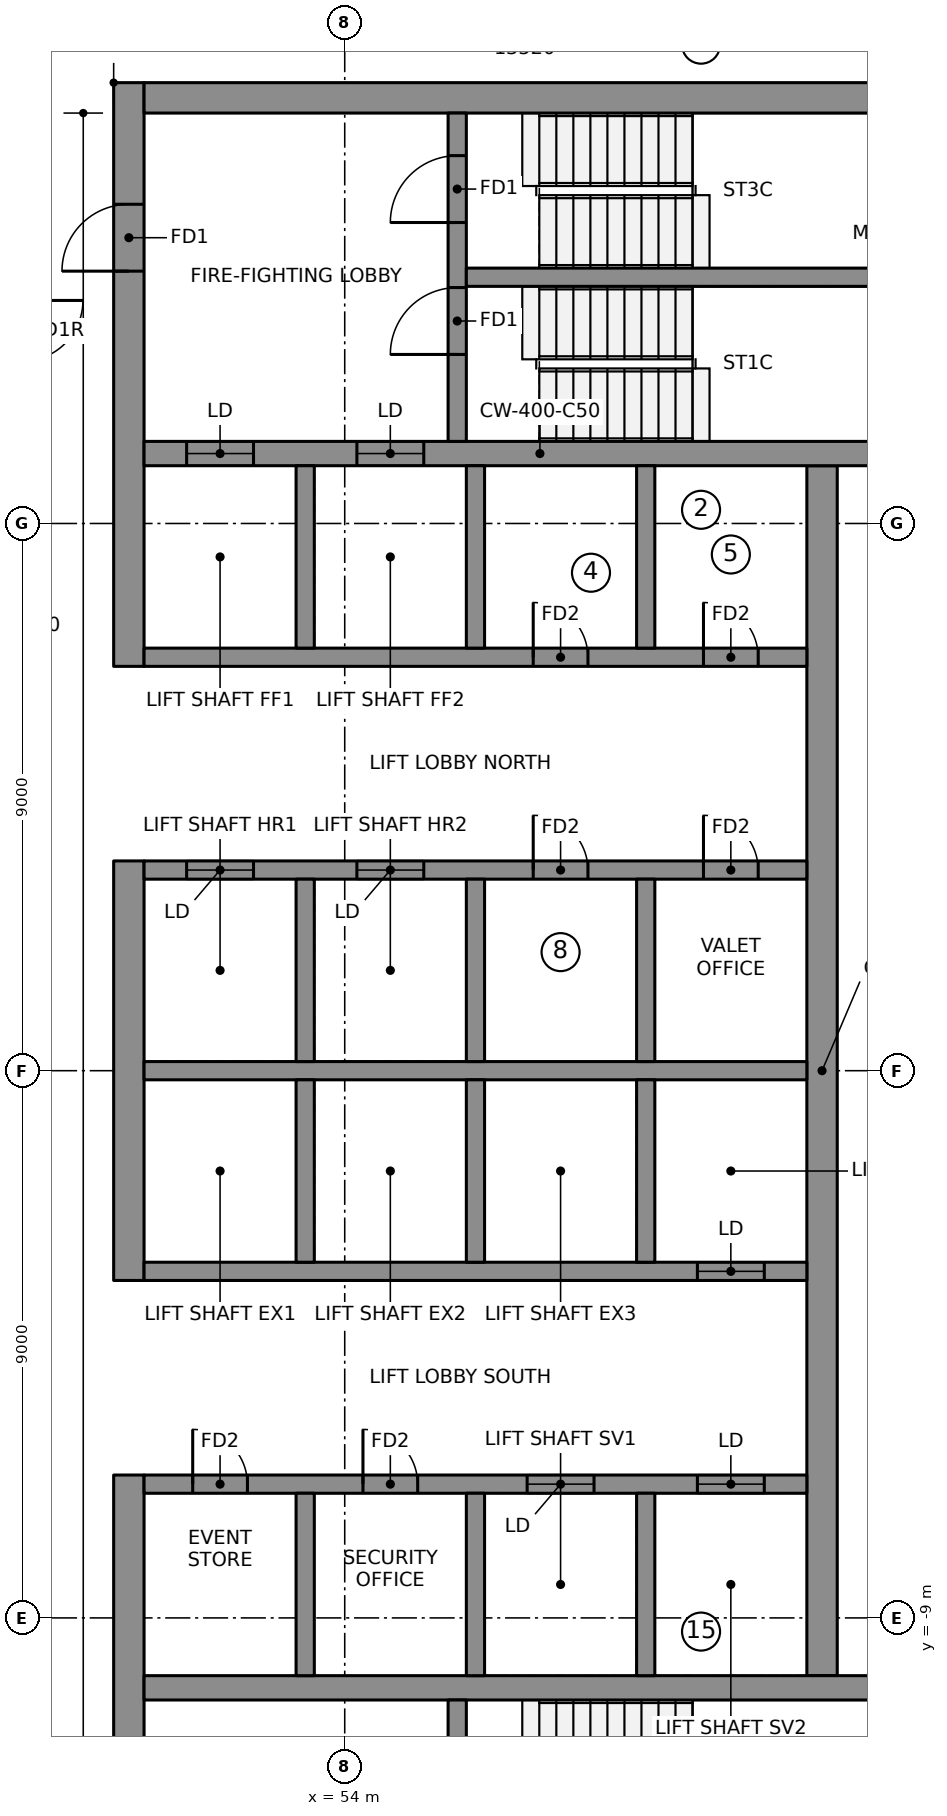
"""IFC4 building model, lengths in metres.
Left out: names, types, materials, properties, quantities, classifications, styles, units other than length and angle.
Written with IfcOpenShell. Run it as: python <this file> out.ifc"""

import sys

from ifc_helpers import new_model, si_unit, direction, frame, frame_2d, origin, place, context, subcontext, project, spatial, rectangle, extrude, element, fill, save


model = new_model("IFC4")
c1 = context("Model", 3, precision=1e-05, world=origin(), true_north=direction((0.0, 1.0)))
c2 = subcontext(c1, "Body", "Model", "MODEL_VIEW")
j1 = project(units=[si_unit("LENGTHUNIT", "METRE"), si_unit("PLANEANGLEUNIT", "RADIAN")], contexts=[c1])
p1 = place(None, origin())
s1 = spatial("IfcSite", under=j1, at=p1, CompositionType="ELEMENT")
p2 = place(p1, origin())
s2 = spatial("IfcBuilding", under=s1, at=p2, CompositionType="ELEMENT")
p3 = place(p2, frame((0.0, 0.0, 271.45)))
s3 = spatial("IfcBuildingStorey", under=s2, at=p3, CompositionType="ELEMENT", Elevation=271.45)
p4 = place(p3, frame((50.45, 6.65, 0.0), z_axis=(0.0, 0.0, 1.0), x_axis=(0.0, 1.0, 0.0)))
e1 = element("IfcWall", 1, at=p4, inside=s3, PredefinedType="SHEAR", context=c2, shape_type="SweptSolid", body=[
    extrude(rectangle(XDim=9.6, YDim=0.5, at=frame_2d((4.8, 0.0))), origin(), (0.0, 0.0, 1.0), 3.55),
])
p5 = place(p4, frame((6.5, 0.0, 0.0)))
e2 = element("IfcOpeningElement", 2, at=p5, cuts=e1, PredefinedType="OPENING", context=c2, shape_type="SweptSolid", body=[
    extrude(rectangle(XDim=1.1, YDim=2.1, at=frame_2d((0.55, 1.05))), frame((0.0, 0.26, 0.0), z_axis=(0.0, -1.0, 0.0), x_axis=(1.0, 0.0, 0.0)), (0.0, 0.0, 1.0), 0.52),
])
p6 = place(p3, frame((50.45, -3.45, 0.0), z_axis=(0.0, 0.0, 1.0), x_axis=(0.0, 1.0, 0.0)))
e3 = element("IfcWall", 3, at=p6, inside=s3, PredefinedType="SHEAR", context=c2, shape_type="SweptSolid", body=[
    extrude(rectangle(XDim=6.9, YDim=0.5, at=frame_2d((3.45, 0.0))), origin(), (0.0, 0.0, 1.0), 3.55),
])
p7 = place(p3, frame((50.45, -16.25, 0.0), z_axis=(0.0, 0.0, 1.0), x_axis=(0.0, 1.0, 0.0)))
e4 = element("IfcWall", 4, at=p7, inside=s3, PredefinedType="SHEAR", context=c2, shape_type="SweptSolid", body=[
    extrude(rectangle(XDim=9.6, YDim=0.5, at=frame_2d((4.8, 0.0))), origin(), (0.0, 0.0, 1.0), 3.55),
])
p8 = place(p7, frame((2.0, 0.0, 0.0)))
e5 = element("IfcOpeningElement", 5, at=p8, cuts=e4, PredefinedType="OPENING", context=c2, shape_type="SweptSolid", body=[
    extrude(rectangle(XDim=1.1, YDim=2.1, at=frame_2d((0.55, 1.05))), frame((0.0, 0.26, 0.0), z_axis=(0.0, -1.0, 0.0), x_axis=(1.0, 0.0, 0.0)), (0.0, 0.0, 1.0), 0.52),
])
p9 = place(p3, frame((50.7, 16.0, 0.0), z_axis=(0.0, 0.0, 1.0), x_axis=(1.0, 0.0, 0.0)))
e6 = element("IfcWall", 6, at=p9, inside=s3, PredefinedType="SHEAR", context=c2, shape_type="SweptSolid", body=[
    extrude(rectangle(XDim=13.52, YDim=0.5, at=frame_2d((6.76, 0.0))), origin(), (0.0, 0.0, 1.0), 3.55),
])
p10 = place(p3, frame((61.85, -9.95, 0.0), z_axis=(0.0, 0.0, 1.0), x_axis=(0.0, 1.0, 0.0)))
e7 = element("IfcWall", 7, at=p10, inside=s3, PredefinedType="SHEAR", context=c2, shape_type="SweptSolid", body=[
    extrude(rectangle(XDim=19.9, YDim=0.5, at=frame_2d((9.95, 0.0))), origin(), (0.0, 0.0, 1.0), 3.55),
])
p11 = place(p3, frame((50.7, 10.15, 0.0), z_axis=(0.0, 0.0, 1.0), x_axis=(1.0, 0.0, 0.0)))
e8 = element("IfcWall", 8, at=p11, inside=s3, PredefinedType="SHEAR", context=c2, shape_type="SweptSolid", body=[
    extrude(rectangle(XDim=13.02, YDim=0.4, at=frame_2d((6.51, 0.0))), origin(), (0.0, 0.0, 1.0), 3.55),
])
p12 = place(p11, frame((0.7, 0.0, 0.0)))
e9 = element("IfcOpeningElement", 9, at=p12, cuts=e8, PredefinedType="OPENING", context=c2, shape_type="SweptSolid", body=[
    extrude(rectangle(XDim=1.1, YDim=2.1, at=frame_2d((0.55, 1.05))), frame((0.0, 0.21, 0.0), z_axis=(0.0, -1.0, 0.0), x_axis=(1.0, 0.0, 0.0)), (0.0, 0.0, 1.0), 0.42),
])
p13 = place(p11, frame((3.5, 0.0, 0.0)))
e10 = element("IfcOpeningElement", 10, at=p13, cuts=e8, PredefinedType="OPENING", context=c2, shape_type="SweptSolid", body=[
    extrude(rectangle(XDim=1.1, YDim=2.1, at=frame_2d((0.55, 1.05))), frame((0.0, 0.21, 0.0), z_axis=(0.0, -1.0, 0.0), x_axis=(1.0, 0.0, 0.0)), (0.0, 0.0, 1.0), 0.42),
])
p14 = place(p3, frame((50.7, -10.15, 0.0), z_axis=(0.0, 0.0, 1.0), x_axis=(1.0, 0.0, 0.0)))
e11 = element("IfcWall", 11, at=p14, inside=s3, PredefinedType="SHEAR", context=c2, shape_type="SweptSolid", body=[
    extrude(rectangle(XDim=13.02, YDim=0.4, at=frame_2d((6.51, 0.0))), origin(), (0.0, 0.0, 1.0), 3.55),
])
p15 = place(p3, frame((50.7, 0.0, 0.0), z_axis=(0.0, 0.0, 1.0), x_axis=(1.0, 0.0, 0.0)))
e12 = element("IfcWall", 12, at=p15, inside=s3, PredefinedType="SHEAR", context=c2, shape_type="SweptSolid", body=[
    extrude(rectangle(XDim=10.9, YDim=0.3, at=frame_2d((5.45, 0.0))), origin(), (0.0, 0.0, 1.0), 3.55),
])
p16 = place(p3, frame((50.7, 3.3, 0.0), z_axis=(0.0, 0.0, 1.0), x_axis=(1.0, 0.0, 0.0)))
e13 = element("IfcWall", 13, at=p16, inside=s3, PredefinedType="SHEAR", context=c2, shape_type="SweptSolid", body=[
    extrude(rectangle(XDim=10.9, YDim=0.3, at=frame_2d((5.45, 0.0))), origin(), (0.0, 0.0, 1.0), 3.55),
])
p17 = place(p16, frame((0.7, 0.0, 0.0)))
e14 = element("IfcOpeningElement", 14, at=p17, cuts=e13, PredefinedType="OPENING", context=c2, shape_type="SweptSolid", body=[
    extrude(rectangle(XDim=1.1, YDim=2.1, at=frame_2d((0.55, 1.05))), frame((0.0, 0.16, 0.0), z_axis=(0.0, -1.0, 0.0), x_axis=(1.0, 0.0, 0.0)), (0.0, 0.0, 1.0), 0.32),
])
p18 = place(p16, frame((3.5, 0.0, 0.0)))
e15 = element("IfcOpeningElement", 15, at=p18, cuts=e13, PredefinedType="OPENING", context=c2, shape_type="SweptSolid", body=[
    extrude(rectangle(XDim=1.1, YDim=2.1, at=frame_2d((0.55, 1.05))), frame((0.0, 0.16, 0.0), z_axis=(0.0, -1.0, 0.0), x_axis=(1.0, 0.0, 0.0)), (0.0, 0.0, 1.0), 0.32),
])
p19 = place(p16, frame((6.4, 0.0, 0.0)))
e16 = element("IfcOpeningElement", 16, at=p19, cuts=e13, PredefinedType="OPENING", context=c2, shape_type="SweptSolid", body=[
    extrude(rectangle(XDim=0.9, YDim=2.1, at=frame_2d((0.45, 1.05))), frame((0.0, 0.16, 0.0), z_axis=(0.0, -1.0, 0.0), x_axis=(1.0, 0.0, 0.0)), (0.0, 0.0, 1.0), 0.32),
])
p20 = place(p16, frame((9.2, 0.0, 0.0)))
e17 = element("IfcOpeningElement", 17, at=p20, cuts=e13, PredefinedType="OPENING", context=c2, shape_type="SweptSolid", body=[
    extrude(rectangle(XDim=0.9, YDim=2.1, at=frame_2d((0.45, 1.05))), frame((0.0, 0.16, 0.0), z_axis=(0.0, -1.0, 0.0), x_axis=(1.0, 0.0, 0.0)), (0.0, 0.0, 1.0), 0.32),
])
p21 = place(p3, frame((50.7, 6.8, 0.0), z_axis=(0.0, 0.0, 1.0), x_axis=(1.0, 0.0, 0.0)))
e18 = element("IfcWall", 18, at=p21, inside=s3, PredefinedType="SHEAR", context=c2, shape_type="SweptSolid", body=[
    extrude(rectangle(XDim=10.9, YDim=0.3, at=frame_2d((5.45, 0.0))), origin(), (0.0, 0.0, 1.0), 3.55),
])
p22 = place(p21, frame((6.4, 0.0, 0.0)))
e19 = element("IfcOpeningElement", 19, at=p22, cuts=e18, PredefinedType="OPENING", context=c2, shape_type="SweptSolid", body=[
    extrude(rectangle(XDim=0.9, YDim=2.1, at=frame_2d((0.45, 1.05))), frame((0.0, 0.16, 0.0), z_axis=(0.0, -1.0, 0.0), x_axis=(1.0, 0.0, 0.0)), (0.0, 0.0, 1.0), 0.32),
])
p23 = place(p21, frame((9.2, 0.0, 0.0)))
e20 = element("IfcOpeningElement", 20, at=p23, cuts=e18, PredefinedType="OPENING", context=c2, shape_type="SweptSolid", body=[
    extrude(rectangle(XDim=0.9, YDim=2.1, at=frame_2d((0.45, 1.05))), frame((0.0, 0.16, 0.0), z_axis=(0.0, -1.0, 0.0), x_axis=(1.0, 0.0, 0.0)), (0.0, 0.0, 1.0), 0.32),
])
for number, where, z_axis, x_axis in (
    (21, (53.35, 0.15, 0.0), (0.0, 0.0, 1.0), (0.0, 1.0, 0.0)),
    (22, (53.35, 6.95, 0.0), (0.0, 0.0, 1.0), (0.0, 1.0, 0.0)),
    (23, (56.15, 0.15, 0.0), (0.0, 0.0, 1.0), (0.0, 1.0, 0.0)),
    (24, (56.15, 6.95, 0.0), (0.0, 0.0, 1.0), (0.0, 1.0, 0.0)),
    (25, (58.95, 0.15, 0.0), (0.0, 0.0, 1.0), (0.0, 1.0, 0.0)),
    (26, (58.95, 6.95, 0.0), (0.0, 0.0, 1.0), (0.0, 1.0, 0.0)),
):
    element("IfcWall", number, at=place(p3, frame(where, z_axis=z_axis, x_axis=x_axis)), inside=s3, PredefinedType="SHEAR", context=c2, shape_type="SweptSolid", body=[
        extrude(rectangle(XDim=3.0, YDim=0.3, at=frame_2d((1.5, 0.0))), origin(), (0.0, 0.0, 1.0), 3.55),
    ])
p24 = place(p3, frame((50.7, -3.3, 0.0), z_axis=(0.0, 0.0, 1.0), x_axis=(1.0, 0.0, 0.0)))
e27 = element("IfcWall", 27, at=p24, inside=s3, PredefinedType="SHEAR", context=c2, shape_type="SweptSolid", body=[
    extrude(rectangle(XDim=10.9, YDim=0.3, at=frame_2d((5.45, 0.0))), origin(), (0.0, 0.0, 1.0), 3.55),
])
p25 = place(p24, frame((9.1, 0.0, 0.0)))
e28 = element("IfcOpeningElement", 28, at=p25, cuts=e27, PredefinedType="OPENING", context=c2, shape_type="SweptSolid", body=[
    extrude(rectangle(XDim=1.1, YDim=2.1, at=frame_2d((0.55, 1.05))), frame((0.0, 0.16, 0.0), z_axis=(0.0, -1.0, 0.0), x_axis=(1.0, 0.0, 0.0)), (0.0, 0.0, 1.0), 0.32),
])
p26 = place(p3, frame((50.7, -6.8, 0.0), z_axis=(0.0, 0.0, 1.0), x_axis=(1.0, 0.0, 0.0)))
e29 = element("IfcWall", 29, at=p26, inside=s3, PredefinedType="SHEAR", context=c2, shape_type="SweptSolid", body=[
    extrude(rectangle(XDim=10.9, YDim=0.3, at=frame_2d((5.45, 0.0))), origin(), (0.0, 0.0, 1.0), 3.55),
])
p27 = place(p26, frame((6.3, 0.0, 0.0)))
e30 = element("IfcOpeningElement", 30, at=p27, cuts=e29, PredefinedType="OPENING", context=c2, shape_type="SweptSolid", body=[
    extrude(rectangle(XDim=1.1, YDim=2.1, at=frame_2d((0.55, 1.05))), frame((0.0, 0.16, 0.0), z_axis=(0.0, -1.0, 0.0), x_axis=(1.0, 0.0, 0.0)), (0.0, 0.0, 1.0), 0.32),
])
p28 = place(p26, frame((9.1, 0.0, 0.0)))
e31 = element("IfcOpeningElement", 31, at=p28, cuts=e29, PredefinedType="OPENING", context=c2, shape_type="SweptSolid", body=[
    extrude(rectangle(XDim=1.1, YDim=2.1, at=frame_2d((0.55, 1.05))), frame((0.0, 0.16, 0.0), z_axis=(0.0, -1.0, 0.0), x_axis=(1.0, 0.0, 0.0)), (0.0, 0.0, 1.0), 0.32),
])
p29 = place(p26, frame((0.8, 0.0, 0.0)))
e32 = element("IfcOpeningElement", 32, at=p29, cuts=e29, PredefinedType="OPENING", context=c2, shape_type="SweptSolid", body=[
    extrude(rectangle(XDim=0.9, YDim=2.1, at=frame_2d((0.45, 1.05))), frame((0.0, 0.16, 0.0), z_axis=(0.0, -1.0, 0.0), x_axis=(1.0, 0.0, 0.0)), (0.0, 0.0, 1.0), 0.32),
])
p30 = place(p26, frame((3.6, 0.0, 0.0)))
e33 = element("IfcOpeningElement", 33, at=p30, cuts=e29, PredefinedType="OPENING", context=c2, shape_type="SweptSolid", body=[
    extrude(rectangle(XDim=0.9, YDim=2.1, at=frame_2d((0.45, 1.05))), frame((0.0, 0.16, 0.0), z_axis=(0.0, -1.0, 0.0), x_axis=(1.0, 0.0, 0.0)), (0.0, 0.0, 1.0), 0.32),
])
for number, where, z_axis, x_axis in (
    (34, (53.35, -3.15, 0.0), (0.0, 0.0, 1.0), (0.0, 1.0, 0.0)),
    (35, (53.35, -9.95, 0.0), (0.0, 0.0, 1.0), (0.0, 1.0, 0.0)),
    (36, (56.15, -3.15, 0.0), (0.0, 0.0, 1.0), (0.0, 1.0, 0.0)),
    (37, (56.15, -9.95, 0.0), (0.0, 0.0, 1.0), (0.0, 1.0, 0.0)),
    (38, (58.95, -3.15, 0.0), (0.0, 0.0, 1.0), (0.0, 1.0, 0.0)),
    (39, (58.95, -9.95, 0.0), (0.0, 0.0, 1.0), (0.0, 1.0, 0.0)),
):
    element("IfcWall", number, at=place(p3, frame(where, z_axis=z_axis, x_axis=x_axis)), inside=s3, PredefinedType="SHEAR", context=c2, shape_type="SweptSolid", body=[
        extrude(rectangle(XDim=3.0, YDim=0.3, at=frame_2d((1.5, 0.0))), origin(), (0.0, 0.0, 1.0), 3.55),
    ])
p31 = place(p3, frame((55.85, 10.35, 0.0), z_axis=(0.0, 0.0, 1.0), x_axis=(0.0, 1.0, 0.0)))
e40 = element("IfcWall", 40, at=p31, inside=s3, PredefinedType="SHEAR", context=c2, shape_type="SweptSolid", body=[
    extrude(rectangle(XDim=5.4, YDim=0.3, at=frame_2d((2.7, 0.0))), origin(), (0.0, 0.0, 1.0), 3.55),
])
p32 = place(p31, frame((1.43, 0.0, 0.0)))
e41 = element("IfcOpeningElement", 41, at=p32, cuts=e40, PredefinedType="OPENING", context=c2, shape_type="SweptSolid", body=[
    extrude(rectangle(XDim=1.1, YDim=2.1, at=frame_2d((0.55, 1.05))), frame((0.0, 0.16, 0.0), z_axis=(0.0, -1.0, 0.0), x_axis=(1.0, 0.0, 0.0)), (0.0, 0.0, 1.0), 0.32),
])
p33 = place(p31, frame((3.6, 0.0, 0.0)))
e42 = element("IfcOpeningElement", 42, at=p33, cuts=e40, PredefinedType="OPENING", context=c2, shape_type="SweptSolid", body=[
    extrude(rectangle(XDim=1.1, YDim=2.1, at=frame_2d((0.55, 1.05))), frame((0.0, 0.16, 0.0), z_axis=(0.0, -1.0, 0.0), x_axis=(1.0, 0.0, 0.0)), (0.0, 0.0, 1.0), 0.32),
])
p34 = place(p3, frame((55.85, -15.75, 0.0), z_axis=(0.0, 0.0, 1.0), x_axis=(0.0, 1.0, 0.0)))
e43 = element("IfcWall", 43, at=p34, inside=s3, PredefinedType="SHEAR", context=c2, shape_type="SweptSolid", body=[
    extrude(rectangle(XDim=5.4, YDim=0.3, at=frame_2d((2.7, 0.0))), origin(), (0.0, 0.0, 1.0), 3.55),
])
p35 = place(p34, frame((3.6, 0.0, 0.0)))
e44 = element("IfcOpeningElement", 44, at=p35, cuts=e43, PredefinedType="OPENING", context=c2, shape_type="SweptSolid", body=[
    extrude(rectangle(XDim=1.1, YDim=2.1, at=frame_2d((0.55, 1.05))), frame((0.0, 0.16, 0.0), z_axis=(0.0, -1.0, 0.0), x_axis=(1.0, 0.0, 0.0)), (0.0, 0.0, 1.0), 0.32),
])
p36 = place(p34, frame((0.8, 0.0, 0.0)))
e45 = element("IfcOpeningElement", 45, at=p36, cuts=e43, PredefinedType="OPENING", context=c2, shape_type="SweptSolid", body=[
    extrude(rectangle(XDim=0.9, YDim=2.1, at=frame_2d((0.45, 1.05))), frame((0.0, 0.16, 0.0), z_axis=(0.0, -1.0, 0.0), x_axis=(1.0, 0.0, 0.0)), (0.0, 0.0, 1.0), 0.32),
])
p37 = place(p3, frame((56.0, 13.05, 0.0), z_axis=(0.0, 0.0, 1.0), x_axis=(1.0, 0.0, 0.0)))
e46 = element("IfcWall", 46, at=p37, inside=s3, PredefinedType="SHEAR", context=c2, shape_type="SweptSolid", body=[
    extrude(rectangle(XDim=7.72, YDim=0.3, at=frame_2d((3.86, 0.0))), origin(), (0.0, 0.0, 1.0), 3.55),
])
p38 = place(p12, origin())
e47 = element("IfcDoor", 47, at=p38, inside=s3, OperationType="DOUBLE_DOOR_SLIDING", PredefinedType="DOOR", context=c2, shape_type="SweptSolid", body=[
    extrude(rectangle(XDim=1.1, YDim=2.1, at=frame_2d((0.55, 1.05))), frame((0.0, 0.025, 0.0), z_axis=(0.0, -1.0, 0.0), x_axis=(1.0, 0.0, 0.0)), (0.0, 0.0, 1.0), 0.05),
])
fill(e9, e47)
p39 = place(p13, origin())
e48 = element("IfcDoor", 48, at=p39, inside=s3, OperationType="DOUBLE_DOOR_SLIDING", PredefinedType="DOOR", context=c2, shape_type="SweptSolid", body=[
    extrude(rectangle(XDim=1.1, YDim=2.1, at=frame_2d((0.55, 1.05))), frame((0.0, 0.025, 0.0), z_axis=(0.0, -1.0, 0.0), x_axis=(1.0, 0.0, 0.0)), (0.0, 0.0, 1.0), 0.05),
])
fill(e10, e48)
p40 = place(p17, origin())
e49 = element("IfcDoor", 49, at=p40, inside=s3, OperationType="DOUBLE_DOOR_SLIDING", PredefinedType="DOOR", context=c2, shape_type="SweptSolid", body=[
    extrude(rectangle(XDim=1.1, YDim=2.1, at=frame_2d((0.55, 1.05))), frame((0.0, 0.025, 0.0), z_axis=(0.0, -1.0, 0.0), x_axis=(1.0, 0.0, 0.0)), (0.0, 0.0, 1.0), 0.05),
])
fill(e14, e49)
p41 = place(p18, origin())
e50 = element("IfcDoor", 50, at=p41, inside=s3, OperationType="DOUBLE_DOOR_SLIDING", PredefinedType="DOOR", context=c2, shape_type="SweptSolid", body=[
    extrude(rectangle(XDim=1.1, YDim=2.1, at=frame_2d((0.55, 1.05))), frame((0.0, 0.025, 0.0), z_axis=(0.0, -1.0, 0.0), x_axis=(1.0, 0.0, 0.0)), (0.0, 0.0, 1.0), 0.05),
])
fill(e15, e50)
p42 = place(p25, origin())
e51 = element("IfcDoor", 51, at=p42, inside=s3, OperationType="DOUBLE_DOOR_SLIDING", PredefinedType="DOOR", context=c2, shape_type="SweptSolid", body=[
    extrude(rectangle(XDim=1.1, YDim=2.1, at=frame_2d((0.55, 1.05))), frame((0.0, 0.025, 0.0), z_axis=(0.0, -1.0, 0.0), x_axis=(1.0, 0.0, 0.0)), (0.0, 0.0, 1.0), 0.05),
])
fill(e28, e51)
p43 = place(p27, origin())
e52 = element("IfcDoor", 52, at=p43, inside=s3, OperationType="DOUBLE_DOOR_SLIDING", PredefinedType="DOOR", context=c2, shape_type="SweptSolid", body=[
    extrude(rectangle(XDim=1.1, YDim=2.1, at=frame_2d((0.55, 1.05))), frame((0.0, 0.025, 0.0), z_axis=(0.0, -1.0, 0.0), x_axis=(1.0, 0.0, 0.0)), (0.0, 0.0, 1.0), 0.05),
])
fill(e30, e52)
p44 = place(p28, origin())
e53 = element("IfcDoor", 53, at=p44, inside=s3, OperationType="DOUBLE_DOOR_SLIDING", PredefinedType="DOOR", context=c2, shape_type="SweptSolid", body=[
    extrude(rectangle(XDim=1.1, YDim=2.1, at=frame_2d((0.55, 1.05))), frame((0.0, 0.025, 0.0), z_axis=(0.0, -1.0, 0.0), x_axis=(1.0, 0.0, 0.0)), (0.0, 0.0, 1.0), 0.05),
])
fill(e31, e53)
p45 = place(p32, origin())
e54 = element("IfcDoor", 54, at=p45, inside=s3, OperationType="SINGLE_SWING_RIGHT", PredefinedType="DOOR", context=c2, shape_type="SweptSolid", body=[
    extrude(rectangle(XDim=1.1, YDim=2.1, at=frame_2d((0.55, 1.05))), frame((0.0, 0.025, 0.0), z_axis=(0.0, -1.0, 0.0), x_axis=(1.0, 0.0, 0.0)), (0.0, 0.0, 1.0), 0.05),
])
fill(e41, e54)
p46 = place(p33, origin())
e55 = element("IfcDoor", 55, at=p46, inside=s3, OperationType="SINGLE_SWING_RIGHT", PredefinedType="DOOR", context=c2, shape_type="SweptSolid", body=[
    extrude(rectangle(XDim=1.1, YDim=2.1, at=frame_2d((0.55, 1.05))), frame((0.0, 0.025, 0.0), z_axis=(0.0, -1.0, 0.0), x_axis=(1.0, 0.0, 0.0)), (0.0, 0.0, 1.0), 0.05),
])
fill(e42, e55)
p47 = place(p5, origin())
e56 = element("IfcDoor", 56, at=p47, inside=s3, OperationType="SINGLE_SWING_RIGHT", PredefinedType="DOOR", context=c2, shape_type="SweptSolid", body=[
    extrude(rectangle(XDim=1.1, YDim=2.1, at=frame_2d((0.55, 1.05))), frame((0.0, 0.025, 0.0), z_axis=(0.0, -1.0, 0.0), x_axis=(1.0, 0.0, 0.0)), (0.0, 0.0, 1.0), 0.05),
])
fill(e2, e56)
p48 = place(p22, origin())
e57 = element("IfcDoor", 57, at=p48, inside=s3, OperationType="SINGLE_SWING_LEFT", PredefinedType="DOOR", context=c2, shape_type="SweptSolid", body=[
    extrude(rectangle(XDim=0.9, YDim=2.1, at=frame_2d((0.45, 1.05))), frame((0.0, 0.025, 0.0), z_axis=(0.0, -1.0, 0.0), x_axis=(1.0, 0.0, 0.0)), (0.0, 0.0, 1.0), 0.05),
])
fill(e19, e57)
p49 = place(p23, origin())
e58 = element("IfcDoor", 58, at=p49, inside=s3, OperationType="SINGLE_SWING_LEFT", PredefinedType="DOOR", context=c2, shape_type="SweptSolid", body=[
    extrude(rectangle(XDim=0.9, YDim=2.1, at=frame_2d((0.45, 1.05))), frame((0.0, 0.025, 0.0), z_axis=(0.0, -1.0, 0.0), x_axis=(1.0, 0.0, 0.0)), (0.0, 0.0, 1.0), 0.05),
])
fill(e20, e58)
p50 = place(p19, origin())
e59 = element("IfcDoor", 59, at=p50, inside=s3, OperationType="SINGLE_SWING_LEFT", PredefinedType="DOOR", context=c2, shape_type="SweptSolid", body=[
    extrude(rectangle(XDim=0.9, YDim=2.1, at=frame_2d((0.45, 1.05))), frame((0.0, 0.025, 0.0), z_axis=(0.0, -1.0, 0.0), x_axis=(1.0, 0.0, 0.0)), (0.0, 0.0, 1.0), 0.05),
])
fill(e16, e59)
p51 = place(p20, origin())
e60 = element("IfcDoor", 60, at=p51, inside=s3, OperationType="SINGLE_SWING_LEFT", PredefinedType="DOOR", context=c2, shape_type="SweptSolid", body=[
    extrude(rectangle(XDim=0.9, YDim=2.1, at=frame_2d((0.45, 1.05))), frame((0.0, 0.025, 0.0), z_axis=(0.0, -1.0, 0.0), x_axis=(1.0, 0.0, 0.0)), (0.0, 0.0, 1.0), 0.05),
])
fill(e17, e60)
p52 = place(p29, origin())
e61 = element("IfcDoor", 61, at=p52, inside=s3, OperationType="SINGLE_SWING_LEFT", PredefinedType="DOOR", context=c2, shape_type="SweptSolid", body=[
    extrude(rectangle(XDim=0.9, YDim=2.1, at=frame_2d((0.45, 1.05))), frame((0.0, 0.025, 0.0), z_axis=(0.0, -1.0, 0.0), x_axis=(1.0, 0.0, 0.0)), (0.0, 0.0, 1.0), 0.05),
])
fill(e32, e61)
p53 = place(p30, origin())
e62 = element("IfcDoor", 62, at=p53, inside=s3, OperationType="SINGLE_SWING_LEFT", PredefinedType="DOOR", context=c2, shape_type="SweptSolid", body=[
    extrude(rectangle(XDim=0.9, YDim=2.1, at=frame_2d((0.45, 1.05))), frame((0.0, 0.025, 0.0), z_axis=(0.0, -1.0, 0.0), x_axis=(1.0, 0.0, 0.0)), (0.0, 0.0, 1.0), 0.05),
])
fill(e33, e62)
save(model, sys.argv[1])
